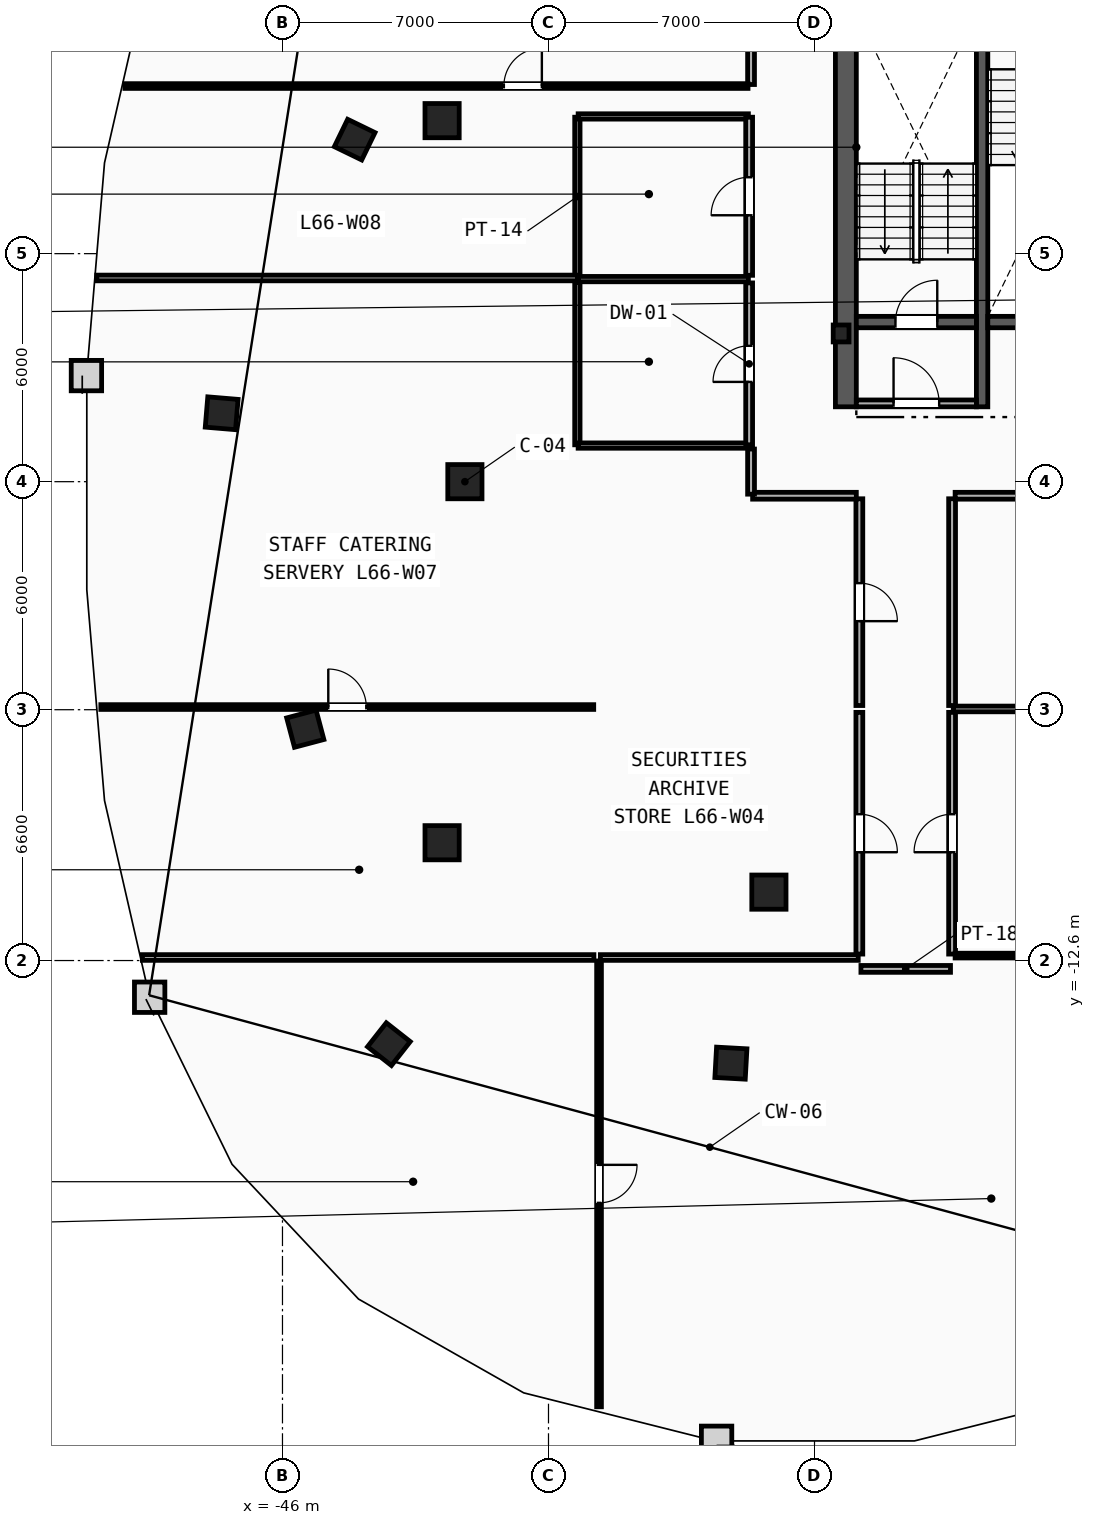
"""IFC4 building model, lengths in metres.
Left out: names, types, materials, properties, quantities, classifications, styles, units other than length and angle.
Written with IfcOpenShell. Run it as: python <this file> out.ifc"""

import sys

from ifc_helpers import new_model, si_unit, direction, frame, frame_2d, origin, origin_2d, place, context, subcontext, project, spatial, rectangle, i_section, extrude, element, fill, save


model = new_model("IFC4")
c1 = context("Model", 3, precision=1e-05, world=origin(), true_north=direction((0.0, 1.0)))
c2 = subcontext(c1, "Body", "Model", "MODEL_VIEW")
j1 = project(units=[si_unit("LENGTHUNIT", "METRE"), si_unit("PLANEANGLEUNIT", "RADIAN")], contexts=[c1])
p1 = place(None, origin())
s1 = spatial("IfcSite", under=j1, at=p1, CompositionType="ELEMENT")
p2 = place(p1, origin())
s2 = spatial("IfcBuilding", under=s1, at=p2, CompositionType="ELEMENT")
p3 = place(p2, frame((0.0, 0.0, 250.4)))
s3 = spatial("IfcBuildingStorey", under=s2, at=p3, CompositionType="ELEMENT", Elevation=250.4)
p4 = place(p3, frame((-31.3, 3.9, 0.0), z_axis=(0.0, 0.0, 1.0), x_axis=(1.0, 0.0, 0.0)))
e1 = element("IfcColumn", 1, at=p4, inside=s3, PredefinedType="COLUMN", context=c2, shape_type="SweptSolid", body=[
    extrude(i_section(OverallWidth=0.416, OverallDepth=0.446, WebThickness=0.039, FlangeThickness=0.063, FilletRadius=0.018, at=origin_2d()), origin(), (0.0, 0.0, 1.0), 3.6),
])
for number, where, z_axis, x_axis in (
    (2, (-41.2, 0.0, 0.0), (0.0, 0.0, 1.0), (1.0, 0.0, 0.0)),
    (3, (-41.8, 9.5, 0.0), (0.0, 0.0, 1.0), (1.0, 0.0, 0.0)),
    (4, (-41.8, -9.5, 0.0), (0.0, 0.0, 1.0), (1.0, 0.0, 0.0)),
    (5, (-33.2, -10.8, 0.0), (0.0, 0.0, 1.0), (1.0, 0.0, 0.0)),
):
    element("IfcColumn", number, at=place(p3, frame(where, z_axis=z_axis, x_axis=x_axis)), inside=s3, PredefinedType="COLUMN", context=c2, shape_type="SweptSolid", body=[
        extrude(rectangle(XDim=0.9, YDim=0.9, at=origin_2d()), origin(), (0.0, 0.0, 1.0), 3.6),
    ])
for number, where, z_axis, x_axis in (
    (6, (-44.1, 9.0, 0.0), (0.0, 0.0, 1.0), (-0.437, -0.899, 0.0)),
    (7, (-47.6, 1.8, 0.0), (0.0, 0.0, 1.0), (-0.084, -0.997, 0.0)),
    (8, (-45.4, -6.5, 0.0), (0.0, 0.0, 1.0), (0.256, -0.967, 0.0)),
    (9, (-43.2, -14.8, 0.0), (0.0, 0.0, 1.0), (0.786, -0.618, 0.0)),
    (10, (-34.2, -15.3, 0.0), (0.0, 0.0, 1.0), (0.998, -0.055, 0.0)),
):
    element("IfcColumn", number, at=place(p3, frame(where, z_axis=z_axis, x_axis=x_axis)), inside=s3, PredefinedType="COLUMN", context=c2, shape_type="SweptSolid", body=[
        extrude(rectangle(XDim=0.8, YDim=0.8, at=origin_2d()), origin(), (0.0, 0.0, 1.0), 3.6),
    ])
p5 = place(p3, frame((-31.175, 1.97, 0.0), z_axis=(0.0, 0.0, 1.0), x_axis=(0.0, 1.0, 0.0)))
e11 = element("IfcWall", 11, at=p5, inside=s3, PredefinedType="SHEAR", context=c2, shape_type="SweptSolid", body=[
    extrude(rectangle(XDim=13.33, YDim=0.55, at=frame_2d((6.665, 0.0))), origin(), (0.0, 0.0, 1.0), 3.34),
])
p6 = place(p3, frame((-27.59, 1.97, 0.0), z_axis=(0.0, 0.0, 1.0), x_axis=(0.0, 1.0, 0.0)))
e12 = element("IfcWall", 12, at=p6, inside=s3, PredefinedType="SHEAR", context=c2, shape_type="SweptSolid", body=[
    extrude(rectangle(XDim=10.68, YDim=0.3, at=frame_2d((5.34, 0.0))), origin(), (0.0, 0.0, 1.0), 3.34),
])
p7 = place(p3, frame((-30.9, 4.2, 0.0), z_axis=(0.0, 0.0, 1.0), x_axis=(1.0, 0.0, 0.0)))
e13 = element("IfcWall", 13, at=p7, inside=s3, PredefinedType="SHEAR", context=c2, shape_type="SweptSolid", body=[
    extrude(rectangle(XDim=3.16, YDim=0.3, at=frame_2d((1.58, 0.0))), origin(), (0.0, 0.0, 1.0), 3.34),
])
p8 = place(p7, frame((1.03, 0.0, 0.0)))
e14 = element("IfcOpeningElement", 14, at=p8, cuts=e13, PredefinedType="OPENING", context=c2, shape_type="SweptSolid", body=[
    extrude(rectangle(XDim=1.1, YDim=2.15, at=frame_2d((0.55, 1.075))), frame((0.0, 0.16, 0.0), z_axis=(0.0, -1.0, 0.0), x_axis=(1.0, 0.0, 0.0)), (0.0, 0.0, 1.0), 0.32),
])
p9 = place(p3, frame((-27.44, 4.2, 0.0), z_axis=(0.0, 0.0, 1.0), x_axis=(1.0, 0.0, 0.0)))
e15 = element("IfcWall", 15, at=p9, inside=s3, PredefinedType="SHEAR", context=c2, shape_type="SweptSolid", body=[
    extrude(rectangle(XDim=3.16, YDim=0.3, at=frame_2d((1.58, 0.0))), origin(), (0.0, 0.0, 1.0), 3.34),
])
p10 = place(p3, frame((-30.9, 2.06, 0.0), z_axis=(0.0, 0.0, 1.0), x_axis=(1.0, 0.0, 0.0)))
e16 = element("IfcWall", 16, at=p10, inside=s3, PredefinedType="PARTITIONING", context=c2, shape_type="SweptSolid", body=[
    extrude(rectangle(XDim=3.16, YDim=0.18, at=frame_2d((1.58, 0.0))), origin(), (0.0, 0.0, 1.0), 3.34),
])
p11 = place(p10, frame((0.98, 0.0, 0.0)))
e17 = element("IfcOpeningElement", 17, at=p11, cuts=e16, PredefinedType="OPENING", context=c2, shape_type="SweptSolid", body=[
    extrude(rectangle(XDim=1.2, YDim=2.15, at=frame_2d((0.6, 1.075))), frame((0.0, 0.1, 0.0), z_axis=(0.0, -1.0, 0.0), x_axis=(1.0, 0.0, 0.0)), (0.0, 0.0, 1.0), 0.2),
])
p12 = place(p3, frame((-38.24, 0.97, 0.0), z_axis=(0.0, 0.0, 1.0), x_axis=(0.0, 1.0, 0.0)))
e18 = element("IfcWall", 18, at=p12, inside=s3, PredefinedType="PARTITIONING", context=c2, shape_type="SweptSolid", body=[
    extrude(rectangle(XDim=4.275, YDim=0.14, at=frame_2d((2.138, 0.0))), origin(), (0.0, 0.0, 1.0), 3.34),
])
p13 = place(p3, frame((-38.24, 5.415, 0.0), z_axis=(0.0, 0.0, 1.0), x_axis=(0.0, 1.0, 0.0)))
e19 = element("IfcWall", 19, at=p13, inside=s3, PredefinedType="PARTITIONING", context=c2, shape_type="SweptSolid", body=[
    extrude(rectangle(XDim=4.175, YDim=0.14, at=frame_2d((2.087, 0.0))), origin(), (0.0, 0.0, 1.0), 3.34),
])
for number, where, z_axis, x_axis in (
    (20, (-38.22, 0.95, 0.0), (0.0, 0.0, 1.0), (1.0, 0.0, 0.0)),
    (21, (-38.22, 5.33, 0.0), (0.0, 0.0, 1.0), (1.0, 0.0, 0.0)),
    (22, (-38.22, 9.61, 0.0), (0.0, 0.0, 1.0), (1.0, 0.0, 0.0)),
):
    element("IfcWall", number, at=place(p3, frame(where, z_axis=z_axis, x_axis=x_axis)), inside=s3, PredefinedType="PARTITIONING", context=c2, shape_type="SweptSolid", body=[
        extrude(rectangle(XDim=4.48, YDim=0.14, at=frame_2d((2.24, 0.0))), origin(), (0.0, 0.0, 1.0), 3.34),
    ])
p14 = place(p3, frame((-33.72, 0.97, 0.0), z_axis=(0.0, 0.0, 1.0), x_axis=(0.0, 1.0, 0.0)))
e23 = element("IfcWall", 23, at=p14, inside=s3, PredefinedType="PARTITIONING", context=c2, shape_type="SweptSolid", body=[
    extrude(rectangle(XDim=4.26, YDim=0.18, at=frame_2d((2.13, 0.0))), origin(), (0.0, 0.0, 1.0), 3.34),
])
p15 = place(p14, frame((1.655, 0.0, 0.0)))
e24 = element("IfcOpeningElement", 24, at=p15, cuts=e23, PredefinedType="OPENING", context=c2, shape_type="SweptSolid", body=[
    extrude(rectangle(XDim=0.95, YDim=2.1, at=frame_2d((0.475, 1.05))), frame((0.0, 0.1, 0.0), z_axis=(0.0, -1.0, 0.0), x_axis=(1.0, 0.0, 0.0)), (0.0, 0.0, 1.0), 0.2),
])
p16 = place(p3, frame((-33.72, 5.43, 0.0), z_axis=(0.0, 0.0, 1.0), x_axis=(0.0, 1.0, 0.0)))
e25 = element("IfcWall", 25, at=p16, inside=s3, PredefinedType="PARTITIONING", context=c2, shape_type="SweptSolid", body=[
    extrude(rectangle(XDim=4.16, YDim=0.18, at=frame_2d((2.08, 0.0))), origin(), (0.0, 0.0, 1.0), 3.34),
])
p17 = place(p16, frame((1.58, 0.0, 0.0)))
e26 = element("IfcOpeningElement", 26, at=p17, cuts=e25, PredefinedType="OPENING", context=c2, shape_type="SweptSolid", body=[
    extrude(rectangle(XDim=1.0, YDim=2.15, at=frame_2d((0.5, 1.075))), frame((0.0, 0.1, 0.0), z_axis=(0.0, -1.0, 0.0), x_axis=(1.0, 0.0, 0.0)), (0.0, 0.0, 1.0), 0.2),
])
p18 = place(p3, frame((-28.35, -5.98, 0.0), z_axis=(0.0, 0.0, 1.0), x_axis=(1.0, 0.0, 0.0)))
e27 = element("IfcWall", 27, at=p18, inside=s3, PredefinedType="PARTITIONING", context=c2, shape_type="SweptSolid", body=[
    extrude(rectangle(XDim=15.185, YDim=0.15, at=frame_2d((7.593, 0.0))), origin(), (0.0, 0.0, 1.0), 3.34),
])
p19 = place(p3, frame((-49.686, -12.52, 0.0), z_axis=(0.0, 0.0, 1.0), x_axis=(1.0, 0.0, 0.0)))
e28 = element("IfcWall", 28, at=p19, inside=s3, PredefinedType="PARTITIONING", context=c2, shape_type="SweptSolid", body=[
    extrude(rectangle(XDim=11.881, YDim=0.15, at=frame_2d((5.94, 0.0))), origin(), (0.0, 0.0, 1.0), 3.34),
])
p20 = place(p3, frame((-37.635, -12.52, 0.0), z_axis=(0.0, 0.0, 1.0), x_axis=(1.0, 0.0, 0.0)))
e29 = element("IfcWall", 29, at=p20, inside=s3, PredefinedType="PARTITIONING", context=c2, shape_type="SweptSolid", body=[
    extrude(rectangle(XDim=6.785, YDim=0.15, at=frame_2d((3.393, 0.0))), origin(), (0.0, 0.0, 1.0), 3.34),
])
p21 = place(p3, frame((-50.887, 5.36, 0.0), z_axis=(0.0, 0.0, 1.0), x_axis=(1.0, 0.0, 0.0)))
e30 = element("IfcWall", 30, at=p21, inside=s3, PredefinedType="PARTITIONING", context=c2, shape_type="SweptSolid", body=[
    extrude(rectangle(XDim=12.648, YDim=0.15, at=frame_2d((6.324, 0.0))), origin(), (0.0, 0.0, 1.0), 3.34),
])
p22 = place(p3, frame((-30.779, -12.82, 0.0), z_axis=(0.0, 0.0, 1.0), x_axis=(1.0, 0.0, 0.0)))
e31 = element("IfcWall", 31, at=p22, inside=s3, PredefinedType="PARTITIONING", context=c2, shape_type="SweptSolid", body=[
    extrude(rectangle(XDim=2.357, YDim=0.18, at=frame_2d((1.179, 0.0))), origin(), (0.0, 0.0, 1.0), 3.34),
])
p23 = place(p3, frame((-30.82, -6.07, 0.0), z_axis=(0.0, 0.0, 1.0), x_axis=(0.0, -1.0, 0.0)))
e32 = element("IfcWall", 32, at=p23, inside=s3, PredefinedType="PARTITIONING", context=c2, shape_type="SweptSolid", body=[
    extrude(rectangle(XDim=6.36, YDim=0.18, at=frame_2d((3.18, 0.0))), origin(), (0.0, 0.0, 1.0), 3.34),
])
p24 = place(p23, frame((2.68, 0.0, 0.0)))
e33 = element("IfcOpeningElement", 33, at=p24, cuts=e32, PredefinedType="OPENING", context=c2, shape_type="SweptSolid", body=[
    extrude(rectangle(XDim=1.0, YDim=2.15, at=frame_2d((0.5, 1.075))), frame((0.0, 0.1, 0.0), z_axis=(0.0, -1.0, 0.0), x_axis=(1.0, 0.0, 0.0)), (0.0, 0.0, 1.0), 0.2),
])
p25 = place(p3, frame((-28.38, -12.43, 0.0), z_axis=(0.0, 0.0, 1.0), x_axis=(0.0, 1.0, 0.0)))
e34 = element("IfcWall", 34, at=p25, inside=s3, PredefinedType="PARTITIONING", context=c2, shape_type="SweptSolid", body=[
    extrude(rectangle(XDim=6.36, YDim=0.18, at=frame_2d((3.18, 0.0))), origin(), (0.0, 0.0, 1.0), 3.34),
])
p26 = place(p25, frame((2.68, 0.0, 0.0)))
e35 = element("IfcOpeningElement", 35, at=p26, cuts=e34, PredefinedType="OPENING", context=c2, shape_type="SweptSolid", body=[
    extrude(rectangle(XDim=1.0, YDim=2.15, at=frame_2d((0.5, 1.075))), frame((0.0, 0.1, 0.0), z_axis=(0.0, -1.0, 0.0), x_axis=(1.0, 0.0, 0.0)), (0.0, 0.0, 1.0), 0.2),
])
p27 = place(p3, frame((-28.3, -0.37, 0.0), z_axis=(0.0, 0.0, 1.0), x_axis=(1.0, 0.0, 0.0)))
e36 = element("IfcWall", 36, at=p27, inside=s3, PredefinedType="PARTITIONING", context=c2, shape_type="SweptSolid", body=[
    extrude(rectangle(XDim=15.349, YDim=0.18, at=frame_2d((7.675, 0.0))), origin(), (0.0, 0.0, 1.0), 3.34),
])
p28 = place(p27, frame((7.175, 0.0, 0.0)))
e37 = element("IfcOpeningElement", 37, at=p28, cuts=e36, PredefinedType="OPENING", context=c2, shape_type="SweptSolid", body=[
    extrude(rectangle(XDim=1.0, YDim=2.15, at=frame_2d((0.5, 1.075))), frame((0.0, 0.1, 0.0), z_axis=(0.0, -1.0, 0.0), x_axis=(1.0, 0.0, 0.0)), (0.0, 0.0, 1.0), 0.2),
])
p29 = place(p3, frame((-28.38, -5.89, 0.0), z_axis=(0.0, 0.0, 1.0), x_axis=(0.0, 1.0, 0.0)))
e38 = element("IfcWall", 38, at=p29, inside=s3, PredefinedType="PARTITIONING", context=c2, shape_type="SweptSolid", body=[
    extrude(rectangle(XDim=5.44, YDim=0.18, at=frame_2d((2.72, 0.0))), origin(), (0.0, 0.0, 1.0), 3.34),
])
p30 = place(p3, frame((-30.82, -0.45, 0.0), z_axis=(0.0, 0.0, 1.0), x_axis=(0.0, -1.0, 0.0)))
e39 = element("IfcWall", 39, at=p30, inside=s3, PredefinedType="PARTITIONING", context=c2, shape_type="SweptSolid", body=[
    extrude(rectangle(XDim=5.44, YDim=0.18, at=frame_2d((2.72, 0.0))), origin(), (0.0, 0.0, 1.0), 3.34),
])
p31 = place(p30, frame((2.22, 0.0, 0.0)))
e40 = element("IfcOpeningElement", 40, at=p31, cuts=e39, PredefinedType="OPENING", context=c2, shape_type="SweptSolid", body=[
    extrude(rectangle(XDim=1.0, YDim=2.15, at=frame_2d((0.5, 1.075))), frame((0.0, 0.1, 0.0), z_axis=(0.0, -1.0, 0.0), x_axis=(1.0, 0.0, 0.0)), (0.0, 0.0, 1.0), 0.2),
])
p32 = place(p3, frame((-33.628, -0.37, 0.0), z_axis=(0.0, 0.0, 1.0), x_axis=(1.0, 0.0, 0.0)))
e41 = element("IfcWall", 41, at=p32, inside=s3, PredefinedType="PARTITIONING", context=c2, shape_type="SweptSolid", body=[
    extrude(rectangle(XDim=2.729, YDim=0.18, at=frame_2d((1.364, 0.0))), origin(), (0.0, 0.0, 1.0), 3.34),
])
p33 = place(p3, frame((-33.67, 0.859, 0.0), z_axis=(0.0, 0.0, 1.0), x_axis=(0.0, -1.0, 0.0)))
e42 = element("IfcWall", 42, at=p33, inside=s3, PredefinedType="PARTITIONING", context=c2, shape_type="SweptSolid", body=[
    extrude(rectangle(XDim=1.187, YDim=0.18, at=frame_2d((0.594, 0.0))), origin(), (0.0, 0.0, 1.0), 3.34),
])
p34 = place(p3, frame((-33.67, 17.428, 0.0), z_axis=(0.0, 0.0, 1.0), x_axis=(0.0, -1.0, 0.0)))
e43 = element("IfcWall", 43, at=p34, inside=s3, PredefinedType="PARTITIONING", context=c2, shape_type="SweptSolid", body=[
    extrude(rectangle(XDim=6.979, YDim=0.18, at=frame_2d((3.489, 0.0))), origin(), (0.0, 0.0, 1.0), 3.34),
])
p35 = place(p3, frame((-28.3, -12.47, 0.0), z_axis=(0.0, 0.0, 1.0), x_axis=(1.0, 0.0, 0.0)))
e44 = element("IfcWall", 44, at=p35, inside=s3, PredefinedType="PARTITIONING", context=c2, shape_type="SweptSolid", body=[
    extrude(rectangle(XDim=13.919, YDim=0.125, at=frame_2d((6.959, 0.0))), origin(), (0.0, 0.0, 1.0), 3.34),
])
p36 = place(p35, frame((6.459, 0.0, 0.0)))
e45 = element("IfcOpeningElement", 45, at=p36, cuts=e44, PredefinedType="OPENING", context=c2, shape_type="SweptSolid", body=[
    extrude(rectangle(XDim=1.0, YDim=2.15, at=frame_2d((0.5, 1.075))), frame((0.0, 0.073, 0.0), z_axis=(0.0, -1.0, 0.0), x_axis=(1.0, 0.0, 0.0)), (0.0, 0.0, 1.0), 0.145),
])
p37 = place(p3, frame((-37.67, -12.61, 0.0), z_axis=(0.0, 0.0, 1.0), x_axis=(0.0, -1.0, 0.0)))
e46 = element("IfcWall", 46, at=p37, inside=s3, PredefinedType="PARTITIONING", context=c2, shape_type="SweptSolid", body=[
    extrude(rectangle(XDim=11.731, YDim=0.125, at=frame_2d((5.866, 0.0))), origin(), (0.0, 0.0, 1.0), 3.34),
])
p38 = place(p37, frame((5.366, 0.0, 0.0)))
e47 = element("IfcOpeningElement", 47, at=p38, cuts=e46, PredefinedType="OPENING", context=c2, shape_type="SweptSolid", body=[
    extrude(rectangle(XDim=1.0, YDim=2.15, at=frame_2d((0.5, 1.075))), frame((0.0, 0.073, 0.0), z_axis=(0.0, -1.0, 0.0), x_axis=(1.0, 0.0, 0.0)), (0.0, 0.0, 1.0), 0.145),
])
p39 = place(p3, frame((-50.779, -5.93, 0.0), z_axis=(0.0, 0.0, 1.0), x_axis=(1.0, 0.0, 0.0)))
e48 = element("IfcWall", 48, at=p39, inside=s3, PredefinedType="PARTITIONING", context=c2, shape_type="SweptSolid", body=[
    extrude(rectangle(XDim=12.969, YDim=0.125, at=frame_2d((6.485, 0.0))), origin(), (0.0, 0.0, 1.0), 3.34),
])
p40 = place(p39, frame((5.985, 0.0, 0.0)))
e49 = element("IfcOpeningElement", 49, at=p40, cuts=e48, PredefinedType="OPENING", context=c2, shape_type="SweptSolid", body=[
    extrude(rectangle(XDim=1.0, YDim=2.15, at=frame_2d((0.5, 1.075))), frame((0.0, 0.073, 0.0), z_axis=(0.0, -1.0, 0.0), x_axis=(1.0, 0.0, 0.0)), (0.0, 0.0, 1.0), 0.145),
])
p41 = place(p3, frame((-50.146, 10.41, 0.0), z_axis=(0.0, 0.0, 1.0), x_axis=(1.0, 0.0, 0.0)))
e50 = element("IfcWall", 50, at=p41, inside=s3, PredefinedType="PARTITIONING", context=c2, shape_type="SweptSolid", body=[
    extrude(rectangle(XDim=16.396, YDim=0.125, at=frame_2d((8.198, 0.0))), origin(), (0.0, 0.0, 1.0), 3.34),
])
p42 = place(p41, frame((9.971, 0.0, 0.0)))
e51 = element("IfcOpeningElement", 51, at=p42, cuts=e50, PredefinedType="OPENING", context=c2, shape_type="SweptSolid", body=[
    extrude(rectangle(XDim=1.0, YDim=2.15, at=frame_2d((0.5, 1.075))), frame((0.0, 0.073, 0.0), z_axis=(0.0, -1.0, 0.0), x_axis=(1.0, 0.0, 0.0)), (0.0, 0.0, 1.0), 0.145),
])
p43 = place(p8, origin())
e52 = element("IfcDoor", 52, at=p43, inside=s3, OperationType="SINGLE_SWING_RIGHT", PredefinedType="DOOR", context=c2, shape_type="SweptSolid", body=[
    extrude(rectangle(XDim=1.1, YDim=2.15, at=frame_2d((0.55, 1.075))), frame((0.0, 0.025, 0.0), z_axis=(0.0, -1.0, 0.0), x_axis=(1.0, 0.0, 0.0)), (0.0, 0.0, 1.0), 0.05),
])
fill(e14, e52)
p44 = place(p11, origin())
e53 = element("IfcDoor", 53, at=p44, inside=s3, OperationType="SINGLE_SWING_LEFT", PredefinedType="DOOR", context=c2, shape_type="SweptSolid", body=[
    extrude(rectangle(XDim=1.2, YDim=2.15, at=frame_2d((0.6, 1.075))), frame((0.0, 0.025, 0.0), z_axis=(0.0, -1.0, 0.0), x_axis=(1.0, 0.0, 0.0)), (0.0, 0.0, 1.0), 0.05),
])
fill(e17, e53)
p45 = place(p42, origin())
e54 = element("IfcDoor", 54, at=p45, inside=s3, OperationType="SINGLE_SWING_RIGHT", PredefinedType="DOOR", context=c2, shape_type="SweptSolid", body=[
    extrude(rectangle(XDim=1.0, YDim=2.15, at=frame_2d((0.5, 1.075))), frame((0.0, 0.025, 0.0), z_axis=(0.0, -1.0, 0.0), x_axis=(1.0, 0.0, 0.0)), (0.0, 0.0, 1.0), 0.05),
])
fill(e51, e54)
p46 = place(p40, origin())
e55 = element("IfcDoor", 55, at=p46, inside=s3, OperationType="SINGLE_SWING_LEFT", PredefinedType="DOOR", context=c2, shape_type="SweptSolid", body=[
    extrude(rectangle(XDim=1.0, YDim=2.15, at=frame_2d((0.5, 1.075))), frame((0.0, 0.025, 0.0), z_axis=(0.0, -1.0, 0.0), x_axis=(1.0, 0.0, 0.0)), (0.0, 0.0, 1.0), 0.05),
])
fill(e49, e55)
p47 = place(p38, origin())
e56 = element("IfcDoor", 56, at=p47, inside=s3, OperationType="SINGLE_SWING_LEFT", PredefinedType="DOOR", context=c2, shape_type="SweptSolid", body=[
    extrude(rectangle(XDim=1.0, YDim=2.15, at=frame_2d((0.5, 1.075))), frame((0.0, 0.025, 0.0), z_axis=(0.0, -1.0, 0.0), x_axis=(1.0, 0.0, 0.0)), (0.0, 0.0, 1.0), 0.05),
])
fill(e47, e56)
p48 = place(p24, origin())
e57 = element("IfcDoor", 57, at=p48, inside=s3, OperationType="SINGLE_SWING_RIGHT", PredefinedType="DOOR", context=c2, shape_type="SweptSolid", body=[
    extrude(rectangle(XDim=1.0, YDim=2.15, at=frame_2d((0.5, 1.075))), frame((0.0, 0.025, 0.0), z_axis=(0.0, -1.0, 0.0), x_axis=(1.0, 0.0, 0.0)), (0.0, 0.0, 1.0), 0.05),
])
fill(e33, e57)
p49 = place(p26, origin())
e58 = element("IfcDoor", 58, at=p49, inside=s3, OperationType="SINGLE_SWING_LEFT", PredefinedType="DOOR", context=c2, shape_type="SweptSolid", body=[
    extrude(rectangle(XDim=1.0, YDim=2.15, at=frame_2d((0.5, 1.075))), frame((0.0, 0.025, 0.0), z_axis=(0.0, -1.0, 0.0), x_axis=(1.0, 0.0, 0.0)), (0.0, 0.0, 1.0), 0.05),
])
fill(e35, e58)
p50 = place(p31, origin())
e59 = element("IfcDoor", 59, at=p50, inside=s3, OperationType="SINGLE_SWING_RIGHT", PredefinedType="DOOR", context=c2, shape_type="SweptSolid", body=[
    extrude(rectangle(XDim=1.0, YDim=2.15, at=frame_2d((0.5, 1.075))), frame((0.0, 0.025, 0.0), z_axis=(0.0, -1.0, 0.0), x_axis=(1.0, 0.0, 0.0)), (0.0, 0.0, 1.0), 0.05),
])
fill(e40, e59)
p51 = place(p15, origin())
e60 = element("IfcDoor", 60, at=p51, inside=s3, OperationType="SINGLE_SWING_LEFT", PredefinedType="DOOR", context=c2, shape_type="SweptSolid", body=[
    extrude(rectangle(XDim=0.95, YDim=2.1, at=frame_2d((0.475, 1.05))), frame((0.0, 0.025, 0.0), z_axis=(0.0, -1.0, 0.0), x_axis=(1.0, 0.0, 0.0)), (0.0, 0.0, 1.0), 0.05),
])
fill(e24, e60)
p52 = place(p17, origin())
e61 = element("IfcDoor", 61, at=p52, inside=s3, OperationType="SINGLE_SWING_LEFT", PredefinedType="DOOR", context=c2, shape_type="SweptSolid", body=[
    extrude(rectangle(XDim=1.0, YDim=2.15, at=frame_2d((0.5, 1.075))), frame((0.0, 0.025, 0.0), z_axis=(0.0, -1.0, 0.0), x_axis=(1.0, 0.0, 0.0)), (0.0, 0.0, 1.0), 0.05),
])
fill(e26, e61)
save(model, sys.argv[1])
